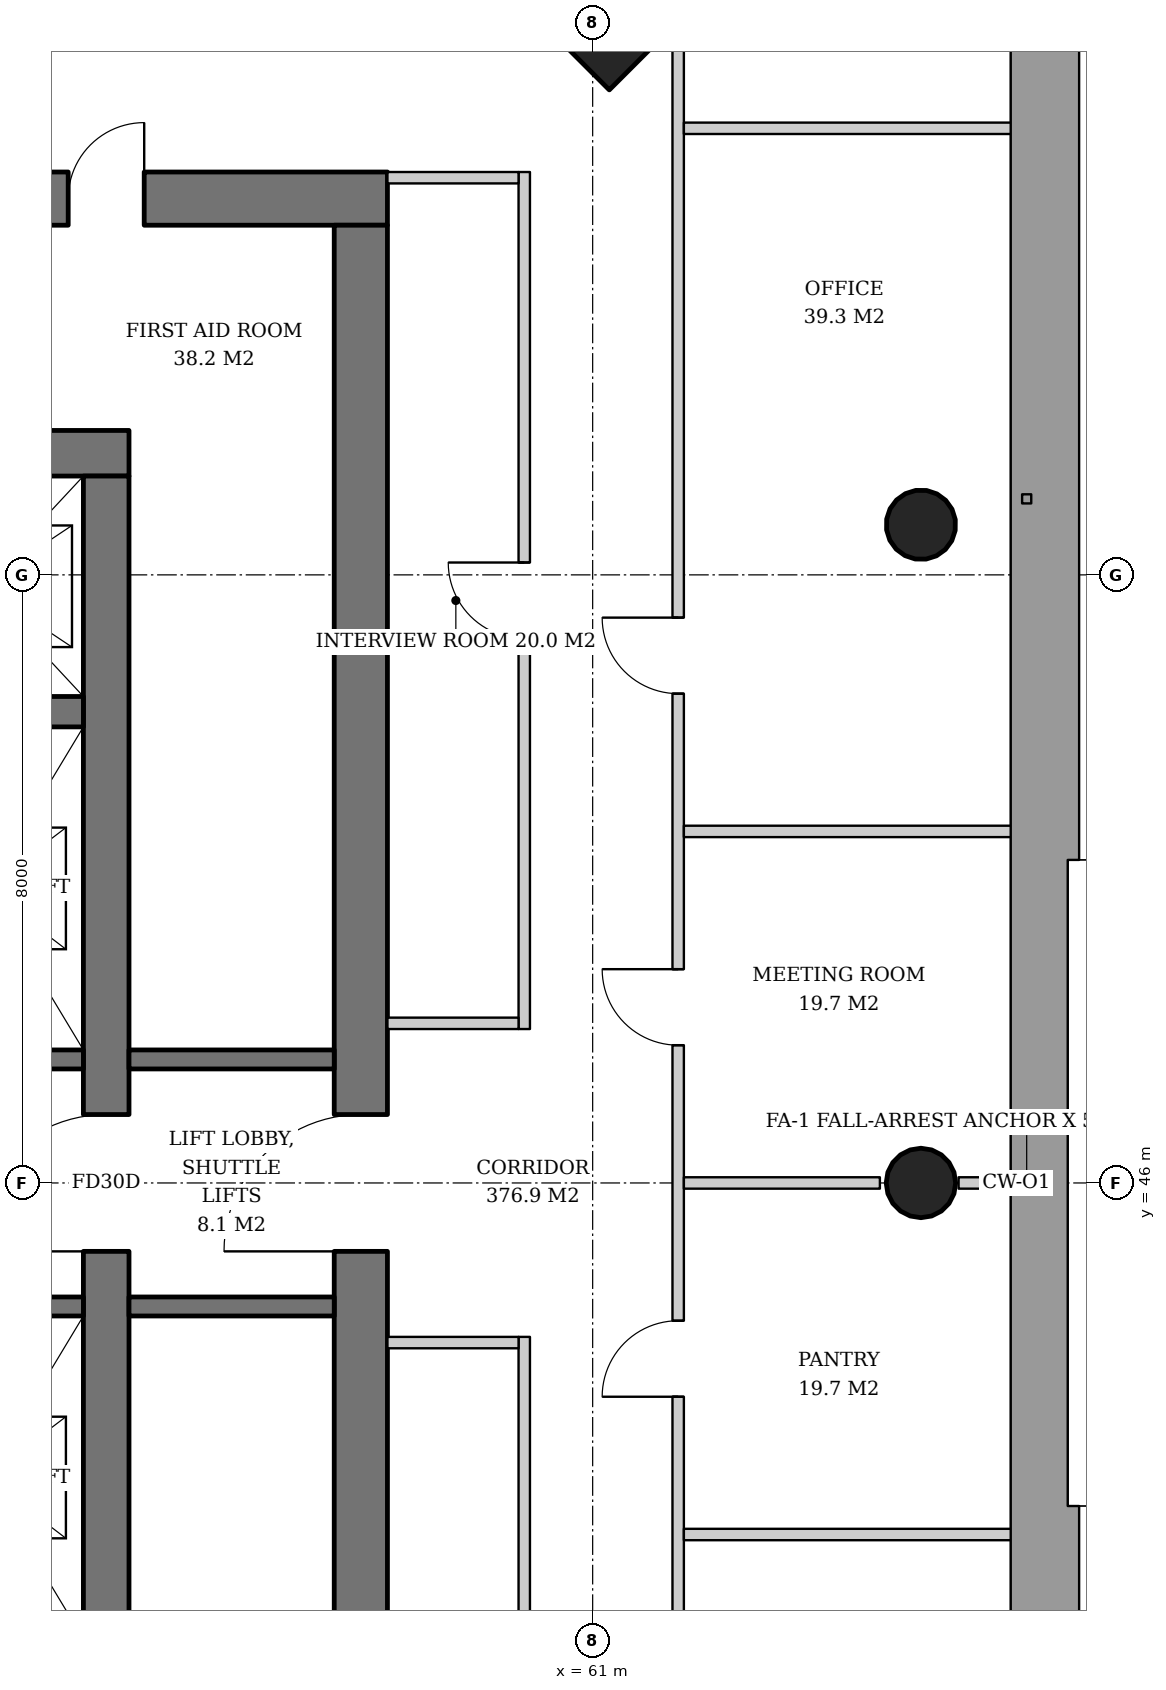
"""IFC4 building model, lengths in metres.
Left out: names, types, materials, properties, quantities, classifications, styles, units other than length and angle.
Written with IfcOpenShell. Run it as: python <this file> out.ifc"""

import sys

from ifc_helpers import new_model, si_unit, direction, frame, frame_2d, origin, origin_2d, place, context, subcontext, project, spatial, rectangle, hollow_circle, extrude, element, fill, save


model = new_model("IFC4")
c1 = context("Model", 3, precision=1e-05, world=origin(), true_north=direction((0.0, 1.0)))
c2 = subcontext(c1, "Body", "Model", "MODEL_VIEW")
j1 = project(units=[si_unit("LENGTHUNIT", "METRE"), si_unit("PLANEANGLEUNIT", "RADIAN")], contexts=[c1])
p1 = place(None, origin())
s1 = spatial("IfcSite", under=j1, at=p1, CompositionType="ELEMENT")
p2 = place(p1, origin())
s2 = spatial("IfcBuilding", under=s1, at=p2, CompositionType="ELEMENT")
p3 = place(p2, frame((0.0, 0.0, 135.0)))
s3 = spatial("IfcBuildingStorey", under=s2, at=p3, CompositionType="ELEMENT", Elevation=135.0)
p4 = place(p3, frame((61.257, 62.257, 0.0), z_axis=(-0.031898107953, -0.031898107953, 0.998981992539), x_axis=(0.707106781187, -0.707106781187, 0.0)))
e1 = element("IfcColumn", 1, at=p4, inside=s3, PredefinedType="COLUMN", context=c2, shape_type="SweptSolid", body=[
    extrude(rectangle(XDim=2.6, YDim=2.6, at=origin_2d()), origin(), (0.0, 0.0, 1.0), 3.804),
])
p5 = place(p3, frame((65.357, 46.0, 0.0), z_axis=(-0.031978496719, 0.0, 0.999488557087), x_axis=(0.0, -1.0, 0.0)))
e2 = element("IfcColumn", 2, at=p5, inside=s3, PredefinedType="COLUMN", context=c2, shape_type="SweptSolid", body=[
    extrude(hollow_circle(Radius=0.457, WallThickness=0.03, at=origin_2d()), origin(), (0.0, 0.0, 1.0), 3.802),
])
p6 = place(p3, frame((65.357, 54.678, 0.0), z_axis=(-0.031974442509, -0.015923015547, 0.999361842679), x_axis=(0.445775033553, -0.895145027055, 0.0)))
e3 = element("IfcColumn", 3, at=p6, inside=s3, PredefinedType="COLUMN", context=c2, shape_type="SweptSolid", body=[
    extrude(hollow_circle(Radius=0.457, WallThickness=0.03, at=origin_2d()), origin(), (0.0, 0.0, 1.0), 3.802),
])
p7 = place(p3, frame((35.1, 55.6, 0.0), z_axis=(0.0, 0.0, 1.0), x_axis=(1.0, 0.0, 0.0)))
e4 = element("IfcWall", 4, at=p7, inside=s3, PredefinedType="SHEAR", context=c2, shape_type="SweptSolid", body=[
    extrude(rectangle(XDim=19.8, YDim=0.6, at=frame_2d((9.9, 0.0))), origin(), (0.0, 0.0, 1.0), 3.8),
])
p8 = place(p7, frame((14.54, 0.0, 0.0)))
e5 = element("IfcOpeningElement", 5, at=p8, cuts=e4, PredefinedType="OPENING", context=c2, shape_type="SweptSolid", body=[
    extrude(rectangle(XDim=1.0, YDim=2.1, at=frame_2d((0.5, 1.05))), frame((0.0, 0.31, 0.0), z_axis=(0.0, -1.0, 0.0), x_axis=(1.0, 0.0, 0.0)), (0.0, 0.0, 1.0), 0.62),
])
p9 = place(p7, frame((2.425, 0.0, 0.0)))
e6 = element("IfcOpeningElement", 6, at=p9, cuts=e4, PredefinedType="OPENING", context=c2, shape_type="SweptSolid", body=[
    extrude(rectangle(XDim=1.0, YDim=2.1, at=frame_2d((0.5, 1.05))), frame((0.0, 0.31, 0.0), z_axis=(0.0, -1.0, 0.0), x_axis=(1.0, 0.0, 0.0)), (0.0, 0.0, 1.0), 0.62),
])
p10 = place(p3, frame((54.6, 36.7, 0.0), z_axis=(0.0, 0.0, 1.0), x_axis=(0.0, 1.0, 0.0)))
e7 = element("IfcWall", 7, at=p10, inside=s3, PredefinedType="SHEAR", context=c2, shape_type="SweptSolid", body=[
    extrude(rectangle(XDim=18.6, YDim=0.6, at=frame_2d((9.3, 0.0))), origin(), (0.0, 0.0, 1.0), 3.8),
])
p11 = place(p10, frame((8.4, 0.0, 0.0)))
e8 = element("IfcOpeningElement", 8, at=p11, cuts=e7, PredefinedType="OPENING", context=c2, shape_type="SweptSolid", body=[
    extrude(rectangle(XDim=1.8, YDim=2.4, at=frame_2d((0.9, 1.2))), frame((0.0, 0.31, 0.0), z_axis=(0.0, -1.0, 0.0), x_axis=(1.0, 0.0, 0.0)), (0.0, 0.0, 1.0), 0.62),
])
p12 = place(p3, frame((31.7, 58.95, 0.0), z_axis=(0.0, 0.0, 1.0), x_axis=(1.0, 0.0, 0.0)))
e9 = element("IfcWall", 9, at=p12, inside=s3, PredefinedType="SHEAR", context=c2, shape_type="SweptSolid", body=[
    extrude(rectangle(XDim=26.6, YDim=0.7, at=frame_2d((13.3, 0.0))), origin(), (0.0, 0.0, 1.0), 3.8),
])
p13 = place(p12, frame((17.94, 0.0, 0.0)))
e10 = element("IfcOpeningElement", 10, at=p13, cuts=e9, PredefinedType="OPENING", context=c2, shape_type="SweptSolid", body=[
    extrude(rectangle(XDim=1.0, YDim=2.1, at=frame_2d((0.5, 1.05))), frame((0.0, 0.36, 0.0), z_axis=(0.0, -1.0, 0.0), x_axis=(1.0, 0.0, 0.0)), (0.0, 0.0, 1.0), 0.72),
])
p14 = place(p12, frame((5.825, 0.0, 0.0)))
e11 = element("IfcOpeningElement", 11, at=p14, cuts=e9, PredefinedType="OPENING", context=c2, shape_type="SweptSolid", body=[
    extrude(rectangle(XDim=1.0, YDim=2.1, at=frame_2d((0.5, 1.05))), frame((0.0, 0.36, 0.0), z_axis=(0.0, -1.0, 0.0), x_axis=(1.0, 0.0, 0.0)), (0.0, 0.0, 1.0), 0.72),
])
p15 = place(p12, frame((1.073, 0.0, 0.0)))
e12 = element("IfcOpeningElement", 12, at=p15, cuts=e9, PredefinedType="OPENING", context=c2, shape_type="SweptSolid", body=[
    extrude(rectangle(XDim=1.0, YDim=2.1, at=frame_2d((0.5, 1.05))), frame((0.0, 0.36, 0.0), z_axis=(0.0, -1.0, 0.0), x_axis=(1.0, 0.0, 0.0)), (0.0, 0.0, 1.0), 0.72),
])
p16 = place(p12, frame((2.611, 0.0, 0.0)))
e13 = element("IfcOpeningElement", 13, at=p16, cuts=e9, PredefinedType="OPENING", context=c2, shape_type="SweptSolid", body=[
    extrude(rectangle(XDim=1.0, YDim=2.1, at=frame_2d((0.5, 1.05))), frame((0.0, 0.36, 0.0), z_axis=(0.0, -1.0, 0.0), x_axis=(1.0, 0.0, 0.0)), (0.0, 0.0, 1.0), 0.72),
])
p17 = place(p12, frame((4.187, 0.0, 0.0)))
e14 = element("IfcOpeningElement", 14, at=p17, cuts=e9, PredefinedType="OPENING", context=c2, shape_type="SweptSolid", body=[
    extrude(rectangle(XDim=1.0, YDim=2.1, at=frame_2d((0.5, 1.05))), frame((0.0, 0.36, 0.0), z_axis=(0.0, -1.0, 0.0), x_axis=(1.0, 0.0, 0.0)), (0.0, 0.0, 1.0), 0.72),
])
p18 = place(p12, frame((8.44, 0.0, 0.0)))
e15 = element("IfcOpeningElement", 15, at=p18, cuts=e9, PredefinedType="OPENING", context=c2, shape_type="SweptSolid", body=[
    extrude(rectangle(XDim=1.0, YDim=2.1, at=frame_2d((0.5, 1.05))), frame((0.0, 0.36, 0.0), z_axis=(0.0, -1.0, 0.0), x_axis=(1.0, 0.0, 0.0)), (0.0, 0.0, 1.0), 0.72),
])
p19 = place(p12, frame((13.342, 0.0, 0.0)))
e16 = element("IfcOpeningElement", 16, at=p19, cuts=e9, PredefinedType="OPENING", context=c2, shape_type="SweptSolid", body=[
    extrude(rectangle(XDim=1.0, YDim=2.1, at=frame_2d((0.5, 1.05))), frame((0.0, 0.36, 0.0), z_axis=(0.0, -1.0, 0.0), x_axis=(1.0, 0.0, 0.0)), (0.0, 0.0, 1.0), 0.72),
])
p20 = place(p12, frame((22.4, 0.0, 0.0)))
e17 = element("IfcOpeningElement", 17, at=p20, cuts=e9, PredefinedType="OPENING", context=c2, shape_type="SweptSolid", body=[
    extrude(rectangle(XDim=1.0, YDim=2.1, at=frame_2d((0.5, 1.05))), frame((0.0, 0.36, 0.0), z_axis=(0.0, -1.0, 0.0), x_axis=(1.0, 0.0, 0.0)), (0.0, 0.0, 1.0), 0.72),
])
p21 = place(p3, frame((57.95, 33.4, 0.0), z_axis=(0.0, 0.0, 1.0), x_axis=(0.0, 1.0, 0.0)))
e18 = element("IfcWall", 18, at=p21, inside=s3, PredefinedType="SHEAR", context=c2, shape_type="SweptSolid", body=[
    extrude(rectangle(XDim=25.2, YDim=0.7, at=frame_2d((12.6, 0.0))), origin(), (0.0, 0.0, 1.0), 3.8),
])
p22 = place(p21, frame((11.7, 0.0, 0.0)))
e19 = element("IfcOpeningElement", 19, at=p22, cuts=e18, PredefinedType="OPENING", context=c2, shape_type="SweptSolid", body=[
    extrude(rectangle(XDim=1.8, YDim=2.4, at=frame_2d((0.9, 1.2))), frame((0.0, 0.36, 0.0), z_axis=(0.0, -1.0, 0.0), x_axis=(1.0, 0.0, 0.0)), (0.0, 0.0, 1.0), 0.72),
])
p23 = place(p3, frame((35.7, 52.2, 0.0), z_axis=(0.0, 0.0, 1.0), x_axis=(1.0, 0.0, 0.0)))
e20 = element("IfcWall", 20, at=p23, inside=s3, PredefinedType="SHEAR", context=c2, shape_type="SweptSolid", body=[
    extrude(rectangle(XDim=18.6, YDim=0.4, at=frame_2d((9.3, 0.0))), origin(), (0.0, 0.0, 1.0), 3.8),
])
for number, where, z_axis, x_axis in (
    (21, (48.93, 47.625, 0.0), (0.0, 0.0, 1.0), (1.0, 0.0, 0.0)),
    (22, (48.93, 44.375, 0.0), (0.0, 0.0, 1.0), (1.0, 0.0, 0.0)),
):
    element("IfcWall", number, at=place(p3, frame(where, z_axis=z_axis, x_axis=x_axis)), inside=s3, PredefinedType="SHEAR", context=c2, shape_type="SweptSolid", body=[
        extrude(rectangle(XDim=5.37, YDim=0.25, at=frame_2d((2.685, 0.0))), origin(), (0.0, 0.0, 1.0), 3.8),
    ])
for number, where, z_axis, x_axis in (
    (23, (54.9, 44.375, 0.0), (0.0, 0.0, 1.0), (1.0, 0.0, 0.0)),
    (24, (54.9, 47.625, 0.0), (0.0, 0.0, 1.0), (1.0, 0.0, 0.0)),
):
    element("IfcWall", number, at=place(p3, frame(where, z_axis=z_axis, x_axis=x_axis)), inside=s3, PredefinedType="SOLIDWALL", context=c2, shape_type="SweptSolid", body=[
        extrude(rectangle(XDim=2.7, YDim=0.25, at=frame_2d((1.35, 0.0))), origin(), (0.0, 0.0, 1.0), 3.62),
    ])
p24 = place(p3, frame((60.1, 32.7, 0.0), z_axis=(0.0, 0.0, 1.0), x_axis=(0.0, 1.0, 0.0)))
e25 = element("IfcWall", 25, at=p24, inside=s3, PredefinedType="PARTITIONING", context=c2, shape_type="SweptSolid", body=[
    extrude(rectangle(XDim=11.275, YDim=0.15, at=frame_2d((5.638, 0.0))), origin(), (0.0, 0.0, 1.0), 2.72),
])
p25 = place(p24, frame((5.137, 0.0, 0.0)))
e26 = element("IfcOpeningElement", 26, at=p25, cuts=e25, PredefinedType="OPENING", context=c2, shape_type="SweptSolid", body=[
    extrude(rectangle(XDim=1.0, YDim=2.1, at=frame_2d((0.5, 1.05))), frame((0.0, 0.085, 0.0), z_axis=(0.0, -1.0, 0.0), x_axis=(1.0, 0.0, 0.0)), (0.0, 0.0, 1.0), 0.17),
])
p26 = place(p3, frame((58.3, 43.9, 0.0), z_axis=(0.0, 0.0, 1.0), x_axis=(1.0, 0.0, 0.0)))
e27 = element("IfcWall", 27, at=p26, inside=s3, PredefinedType="PARTITIONING", context=c2, shape_type="SweptSolid", body=[
    extrude(rectangle(XDim=1.725, YDim=0.15, at=frame_2d((0.862, 0.0))), origin(), (0.0, 0.0, 1.0), 3.62),
])
p27 = place(p3, frame((60.1, 48.025, 0.0), z_axis=(0.0, 0.0, 1.0), x_axis=(0.0, 1.0, 0.0)))
e28 = element("IfcWall", 28, at=p27, inside=s3, PredefinedType="PARTITIONING", context=c2, shape_type="SweptSolid", body=[
    extrude(rectangle(XDim=11.275, YDim=0.15, at=frame_2d((5.638, 0.0))), origin(), (0.0, 0.0, 1.0), 2.806),
])
p28 = place(p27, frame((5.137, 0.0, 0.0)))
e29 = element("IfcOpeningElement", 29, at=p28, cuts=e28, PredefinedType="OPENING", context=c2, shape_type="SweptSolid", body=[
    extrude(rectangle(XDim=1.0, YDim=2.1, at=frame_2d((0.5, 1.05))), frame((0.0, 0.085, 0.0), z_axis=(0.0, -1.0, 0.0), x_axis=(1.0, 0.0, 0.0)), (0.0, 0.0, 1.0), 0.17),
])
for number, where, z_axis, x_axis in (
    (30, (58.3, 48.1, 0.0), (0.0, 0.0, 1.0), (1.0, 0.0, 0.0)),
    (31, (58.3, 59.225, 0.0), (0.0, 0.0, 1.0), (1.0, 0.0, 0.0)),
):
    element("IfcWall", number, at=place(p3, frame(where, z_axis=z_axis, x_axis=x_axis)), inside=s3, PredefinedType="PARTITIONING", context=c2, shape_type="SweptSolid", body=[
        extrude(rectangle(XDim=1.725, YDim=0.15, at=frame_2d((0.862, 0.0))), origin(), (0.0, 0.0, 1.0), 3.62),
    ])
p29 = place(p3, frame((62.125, 30.789, 0.0), z_axis=(0.0, 0.0, 1.0), x_axis=(0.0, 1.0, 0.0)))
e32 = element("IfcWall", 32, at=p29, inside=s3, PredefinedType="PARTITIONING", context=c2, shape_type="SweptSolid", body=[
    extrude(rectangle(XDim=30.423, YDim=0.15, at=frame_2d((15.211, 0.0))), origin(), (0.0, 0.0, 1.0), 2.72),
])
p30 = place(p29, frame((3.149, 0.0, 0.0)))
e33 = element("IfcOpeningElement", 33, at=p30, cuts=e32, PredefinedType="OPENING", context=c2, shape_type="SweptSolid", body=[
    extrude(rectangle(XDim=1.0, YDim=2.1, at=frame_2d((0.5, 1.05))), frame((0.0, 0.085, 0.0), z_axis=(0.0, -1.0, 0.0), x_axis=(1.0, 0.0, 0.0)), (0.0, 0.0, 1.0), 0.17),
])
p31 = place(p29, frame((7.774, 0.0, 0.0)))
e34 = element("IfcOpeningElement", 34, at=p31, cuts=e32, PredefinedType="OPENING", context=c2, shape_type="SweptSolid", body=[
    extrude(rectangle(XDim=1.0, YDim=2.1, at=frame_2d((0.5, 1.05))), frame((0.0, 0.085, 0.0), z_axis=(0.0, -1.0, 0.0), x_axis=(1.0, 0.0, 0.0)), (0.0, 0.0, 1.0), 0.17),
])
p32 = place(p29, frame((12.399, 0.0, 0.0)))
e35 = element("IfcOpeningElement", 35, at=p32, cuts=e32, PredefinedType="OPENING", context=c2, shape_type="SweptSolid", body=[
    extrude(rectangle(XDim=1.0, YDim=2.1, at=frame_2d((0.5, 1.05))), frame((0.0, 0.085, 0.0), z_axis=(0.0, -1.0, 0.0), x_axis=(1.0, 0.0, 0.0)), (0.0, 0.0, 1.0), 0.17),
])
p33 = place(p29, frame((17.024, 0.0, 0.0)))
e36 = element("IfcOpeningElement", 36, at=p33, cuts=e32, PredefinedType="OPENING", context=c2, shape_type="SweptSolid", body=[
    extrude(rectangle(XDim=1.0, YDim=2.1, at=frame_2d((0.5, 1.05))), frame((0.0, 0.085, 0.0), z_axis=(0.0, -1.0, 0.0), x_axis=(1.0, 0.0, 0.0)), (0.0, 0.0, 1.0), 0.17),
])
p34 = place(p29, frame((21.649, 0.0, 0.0)))
e37 = element("IfcOpeningElement", 37, at=p34, cuts=e32, PredefinedType="OPENING", context=c2, shape_type="SweptSolid", body=[
    extrude(rectangle(XDim=1.0, YDim=2.1, at=frame_2d((0.5, 1.05))), frame((0.0, 0.085, 0.0), z_axis=(0.0, -1.0, 0.0), x_axis=(1.0, 0.0, 0.0)), (0.0, 0.0, 1.0), 0.17),
])
p35 = place(p3, frame((62.2, 41.375, 0.0), z_axis=(0.0, 0.0, 1.0), x_axis=(1.0, 0.0, 0.0)))
e38 = element("IfcWall", 38, at=p35, inside=s3, PredefinedType="PARTITIONING", context=c2, shape_type="SweptSolid", body=[
    extrude(rectangle(XDim=4.34, YDim=0.15, at=frame_2d((2.17, 0.0))), origin(), (0.0, 0.0, 1.0), 2.82),
])
p36 = place(p3, frame((62.2, 46.0, 0.0), z_axis=(0.0, 0.0, 1.0), x_axis=(1.0, 0.0, 0.0)))
e39 = element("IfcWall", 39, at=p36, inside=s3, PredefinedType="PARTITIONING", context=c2, shape_type="SweptSolid", body=[
    extrude(rectangle(XDim=2.579, YDim=0.15, at=frame_2d((1.29, 0.0))), origin(), (0.0, 0.0, 1.0), 3.62),
])
p37 = place(p3, frame((65.814, 46.0, 0.0), z_axis=(0.0, 0.0, 1.0), x_axis=(1.0, 0.0, 0.0)))
e40 = element("IfcWall", 40, at=p37, inside=s3, PredefinedType="PARTITIONING", context=c2, shape_type="SweptSolid", body=[
    extrude(rectangle(XDim=0.726, YDim=0.15, at=frame_2d((0.363, 0.0))), origin(), (0.0, 0.0, 1.0), 3.62),
])
for number, where, z_axis, x_axis in (
    (41, (62.2, 50.625, 0.0), (0.0, 0.0, 1.0), (1.0, 0.0, 0.0)),
    (42, (62.2, 59.875, 0.0), (0.0, 0.0, 1.0), (1.0, 0.0, 0.0)),
):
    element("IfcWall", number, at=place(p3, frame(where, z_axis=z_axis, x_axis=x_axis)), inside=s3, PredefinedType="PARTITIONING", context=c2, shape_type="SweptSolid", body=[
        extrude(rectangle(XDim=4.34, YDim=0.15, at=frame_2d((2.17, 0.0))), origin(), (0.0, 0.0, 1.0), 2.82),
    ])
p38 = place(p11, origin())
e43 = element("IfcDoor", 43, at=p38, inside=s3, OperationType="DOUBLE_DOOR_SINGLE_SWING", PredefinedType="DOOR", context=c2, shape_type="SweptSolid", body=[
    extrude(rectangle(XDim=1.8, YDim=2.4, at=frame_2d((0.9, 1.2))), frame((0.0, 0.025, 0.0), z_axis=(0.0, -1.0, 0.0), x_axis=(1.0, 0.0, 0.0)), (0.0, 0.0, 1.0), 0.05),
])
fill(e8, e43)
p39 = place(p22, origin())
e44 = element("IfcDoor", 44, at=p39, inside=s3, OperationType="DOUBLE_DOOR_SINGLE_SWING", PredefinedType="DOOR", context=c2, shape_type="SweptSolid", body=[
    extrude(rectangle(XDim=1.8, YDim=2.4, at=frame_2d((0.9, 1.2))), frame((0.0, 0.025, 0.0), z_axis=(0.0, -1.0, 0.0), x_axis=(1.0, 0.0, 0.0)), (0.0, 0.0, 1.0), 0.05),
])
fill(e19, e44)
p40 = place(p20, origin())
e45 = element("IfcDoor", 45, at=p40, inside=s3, OperationType="SINGLE_SWING_RIGHT", PredefinedType="DOOR", context=c2, shape_type="SweptSolid", body=[
    extrude(rectangle(XDim=1.0, YDim=2.1, at=frame_2d((0.5, 1.05))), frame((0.0, -0.29, 0.0), z_axis=(0.0, -1.0, 0.0), x_axis=(1.0, 0.0, 0.0)), (0.0, 0.0, 1.0), 0.05),
])
fill(e17, e45)
p41 = place(p28, origin())
e46 = element("IfcDoor", 46, at=p41, inside=s3, OperationType="SINGLE_SWING_RIGHT", PredefinedType="DOOR", context=c2, shape_type="SweptSolid", body=[
    extrude(rectangle(XDim=1.0, YDim=2.1, at=frame_2d((0.5, 1.05))), frame((0.0, 0.025, 0.0), z_axis=(0.0, -1.0, 0.0), x_axis=(1.0, 0.0, 0.0)), (0.0, 0.0, 1.0), 0.05),
])
fill(e29, e46)
p42 = place(p32, origin())
e47 = element("IfcDoor", 47, at=p42, inside=s3, OperationType="SINGLE_SWING_LEFT", PredefinedType="DOOR", context=c2, shape_type="SweptSolid", body=[
    extrude(rectangle(XDim=1.0, YDim=2.1, at=frame_2d((0.5, 1.05))), frame((0.0, 0.025, 0.0), z_axis=(0.0, -1.0, 0.0), x_axis=(1.0, 0.0, 0.0)), (0.0, 0.0, 1.0), 0.05),
])
fill(e35, e47)
p43 = place(p33, origin())
e48 = element("IfcDoor", 48, at=p43, inside=s3, OperationType="SINGLE_SWING_RIGHT", PredefinedType="DOOR", context=c2, shape_type="SweptSolid", body=[
    extrude(rectangle(XDim=1.0, YDim=2.1, at=frame_2d((0.5, 1.05))), frame((0.0, 0.025, 0.0), z_axis=(0.0, -1.0, 0.0), x_axis=(1.0, 0.0, 0.0)), (0.0, 0.0, 1.0), 0.05),
])
fill(e36, e48)
p44 = place(p34, origin())
e49 = element("IfcDoor", 49, at=p44, inside=s3, OperationType="SINGLE_SWING_RIGHT", PredefinedType="DOOR", context=c2, shape_type="SweptSolid", body=[
    extrude(rectangle(XDim=1.0, YDim=2.1, at=frame_2d((0.5, 1.05))), frame((0.0, 0.025, 0.0), z_axis=(0.0, -1.0, 0.0), x_axis=(1.0, 0.0, 0.0)), (0.0, 0.0, 1.0), 0.05),
])
fill(e37, e49)
save(model, sys.argv[1])
